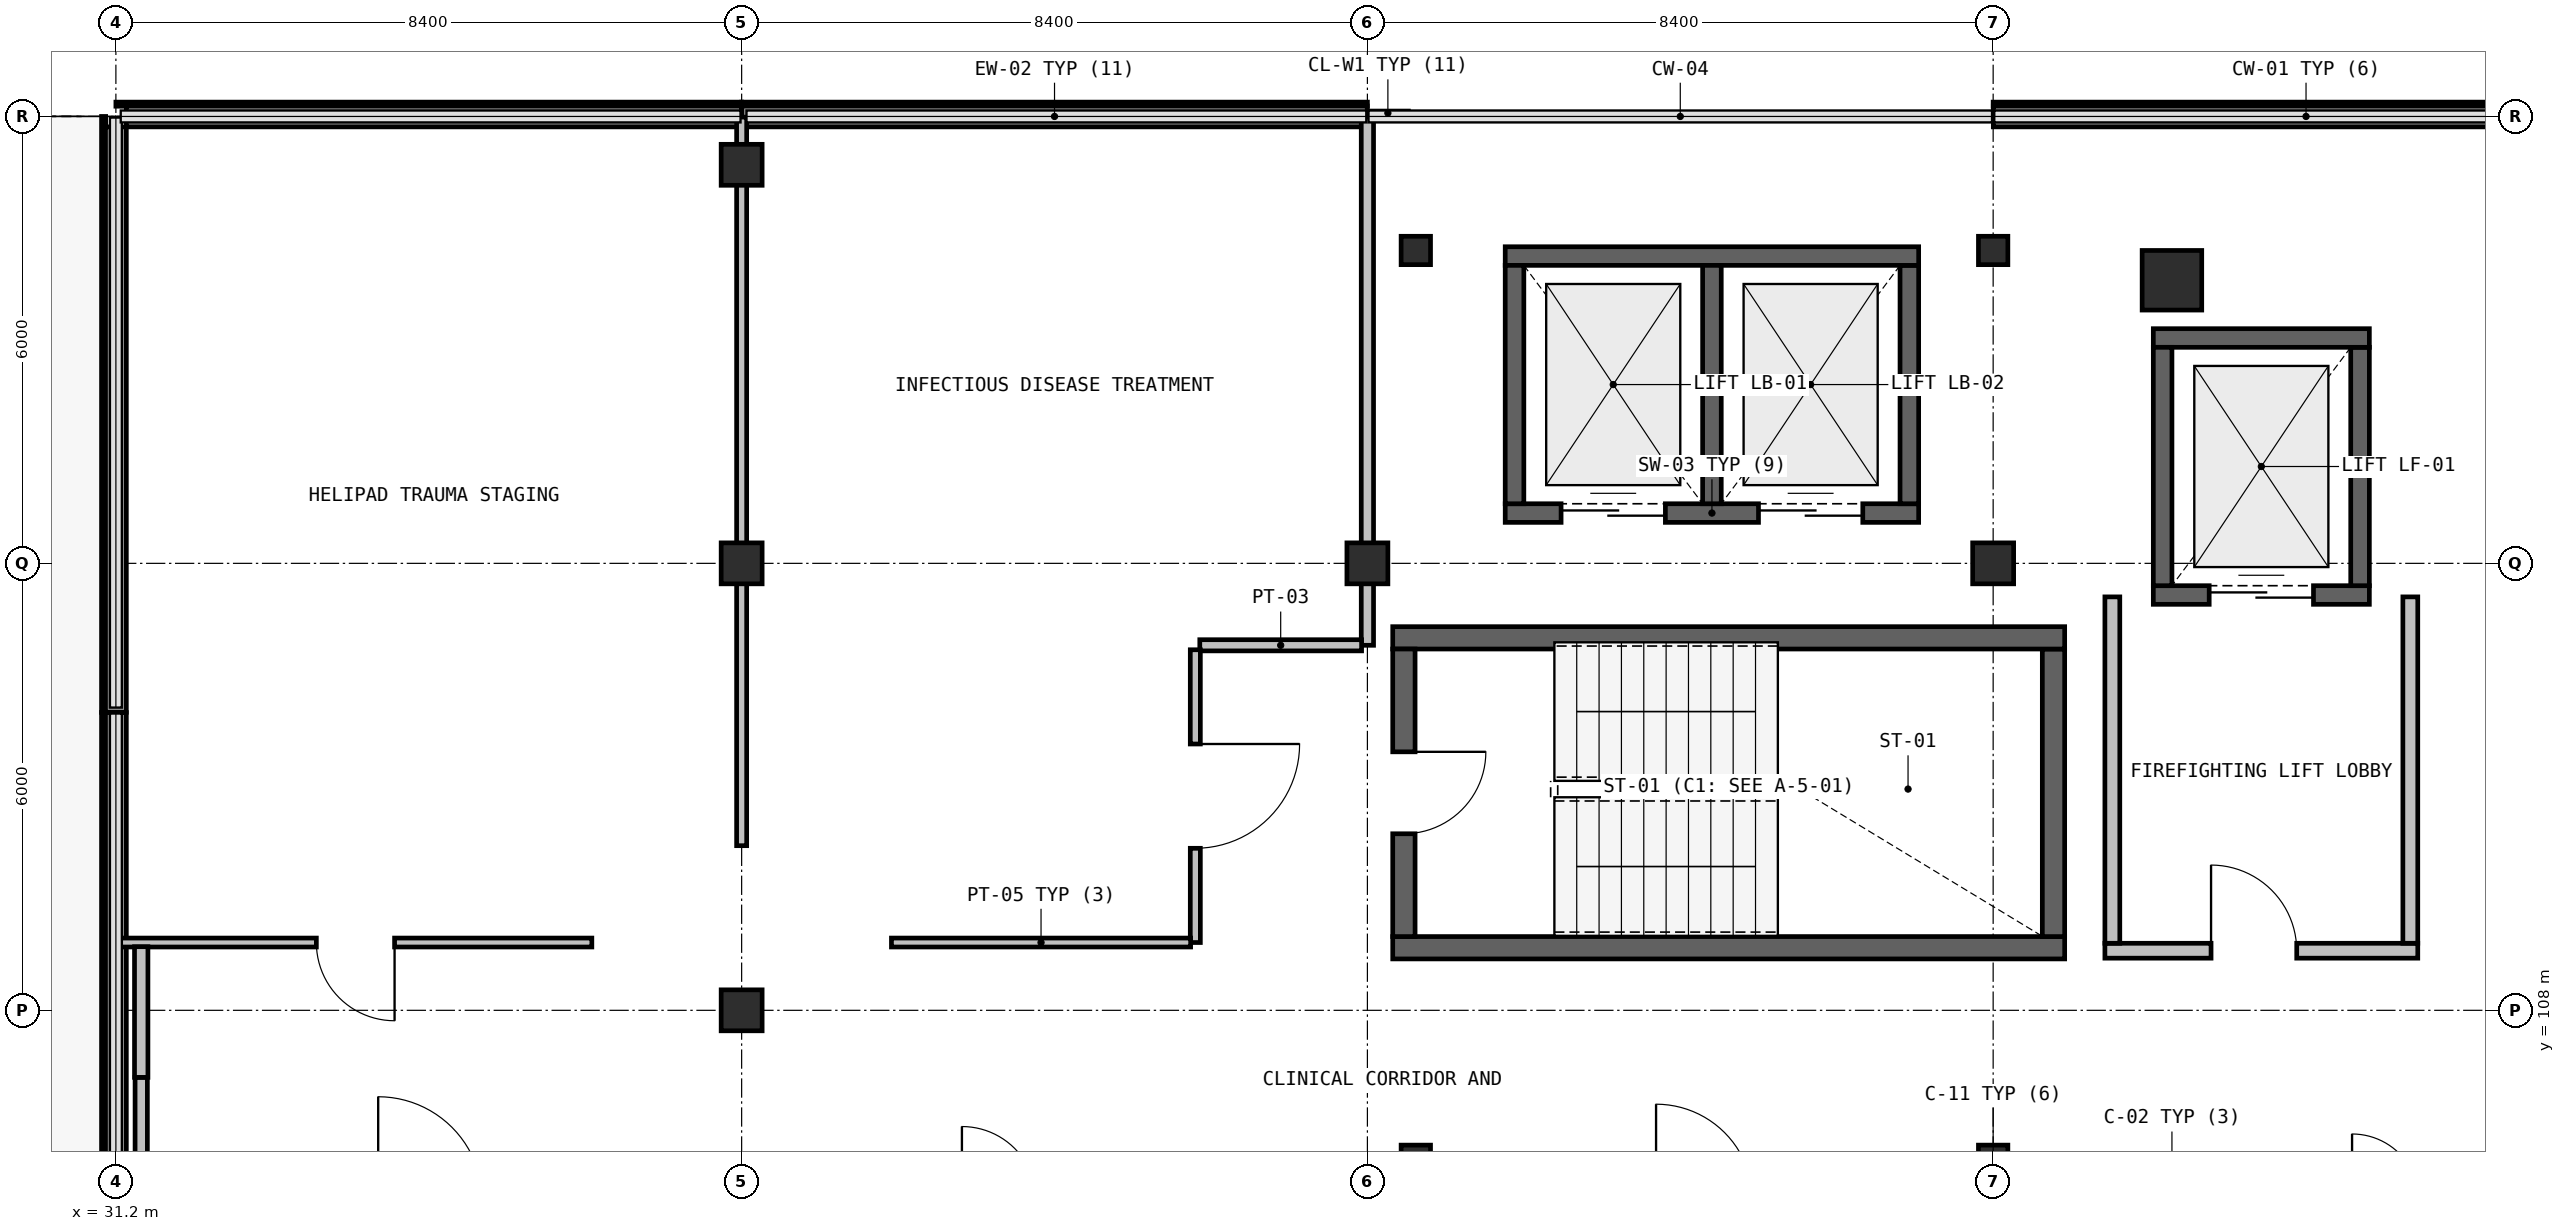
"""IFC4 building model, lengths in metres.
Left out: names, types, materials, properties, quantities, classifications, styles, units other than length and angle.
Written with IfcOpenShell. Run it as: python <this file> out.ifc"""

import sys

from ifc_helpers import new_model, si_unit, direction, frame, frame_2d, origin, origin_2d, place, context, subcontext, project, spatial, rectangle, i_section, extrude, element, fill, save


model = new_model("IFC4")
c1 = context("Model", 3, precision=1e-05, world=origin(), true_north=direction((0.0, 1.0)))
c2 = subcontext(c1, "Body", "Model", "MODEL_VIEW")
j1 = project(units=[si_unit("LENGTHUNIT", "METRE"), si_unit("PLANEANGLEUNIT", "RADIAN")], contexts=[c1])
p1 = place(None, origin())
s1 = spatial("IfcSite", under=j1, at=p1, CompositionType="ELEMENT")
p2 = place(p1, origin())
s2 = spatial("IfcBuilding", under=s1, at=p2, CompositionType="ELEMENT")
p3 = place(p2, frame((0.0, 0.0, 35.4)))
s3 = spatial("IfcBuildingStorey", under=s2, at=p3, CompositionType="ELEMENT", Elevation=35.4)
p4 = place(p3, frame((58.8, 117.8, 0.0), z_axis=(0.0, 0.0, 1.0), x_axis=(1.0, 0.0, 0.0)))
e1 = element("IfcColumn", 1, at=p4, inside=s3, PredefinedType="COLUMN", context=c2, shape_type="SweptSolid", body=[
    extrude(rectangle(XDim=0.8, YDim=0.8, at=origin_2d()), origin(), (0.0, 0.0, 1.0), 4.05),
])
for number, where, z_axis, x_axis in (
    (2, (48.65, 106.0, 0.0), (0.0, 0.0, 1.0), (1.0, 0.0, 0.0)),
    (3, (56.4, 106.0, 0.0), (0.0, 0.0, 1.0), (1.0, 0.0, 0.0)),
    (4, (48.65, 118.2, 0.0), (0.0, 0.0, 1.0), (1.0, 0.0, 0.0)),
    (5, (56.4, 118.2, 0.0), (0.0, 0.0, 1.0), (1.0, 0.0, 0.0)),
):
    element("IfcColumn", number, at=place(p3, frame(where, z_axis=z_axis, x_axis=x_axis)), inside=s3, PredefinedType="COLUMN", context=c2, shape_type="SweptSolid", body=[
        extrude(i_section(OverallWidth=0.395, OverallDepth=0.381, WebThickness=0.018, FlangeThickness=0.03, at=origin_2d()), origin(), (0.0, 0.0, 1.0), 4.05),
    ])
for number, where, z_axis, x_axis in (
    (6, (39.6, 108.0, 0.0), (0.0, 0.0, 1.0), (1.0, 0.0, 0.0)),
    (7, (39.6, 114.0, 0.0), (0.0, 0.0, 1.0), (1.0, 0.0, 0.0)),
    (8, (39.6, 119.35, 0.0), (0.0, 0.0, 1.0), (1.0, 0.0, 0.0)),
    (9, (48.0, 114.0, 0.0), (0.0, 0.0, 1.0), (1.0, 0.0, 0.0)),
    (10, (56.4, 114.0, 0.0), (0.0, 0.0, 1.0), (1.0, 0.0, 0.0)),
):
    element("IfcColumn", number, at=place(p3, frame(where, z_axis=z_axis, x_axis=x_axis)), inside=s3, PredefinedType="COLUMN", context=c2, shape_type="SweptSolid", body=[
        extrude(rectangle(XDim=0.55, YDim=0.55, at=origin_2d()), origin(), (0.0, 0.0, 1.0), 3.74),
    ])
p5 = place(p3, frame((31.2, 104.001, 0.0), z_axis=(0.0, 0.0, 1.0), x_axis=(0.0, 1.0, 0.0)))
e11 = element("IfcWall", 11, at=p5, inside=s3, PredefinedType="SOLIDWALL", context=c2, shape_type="SweptSolid", body=[
    extrude(rectangle(XDim=7.996, YDim=0.28, at=frame_2d((3.998, 0.0))), origin(), (0.0, 0.0, 1.0), 0.94),
])
p6 = place(p3, frame((31.2, 112.001, 0.0), z_axis=(0.0, 0.0, 1.0), x_axis=(0.0, 1.0, 0.0)))
e12 = element("IfcWall", 12, at=p6, inside=s3, PredefinedType="SOLIDWALL", context=c2, shape_type="SweptSolid", body=[
    extrude(rectangle(XDim=7.858, YDim=0.28, at=frame_2d((3.929, 0.0))), origin(), (0.0, 0.0, 1.0), 0.94),
])
p7 = place(p3, frame((31.34, 119.999, 0.0), z_axis=(0.0, 0.0, 1.0), x_axis=(1.0, 0.0, 0.0)))
e13 = element("IfcWall", 13, at=p7, inside=s3, PredefinedType="SOLIDWALL", context=c2, shape_type="SweptSolid", body=[
    extrude(rectangle(XDim=8.258, YDim=0.28, at=frame_2d((4.129, 0.0))), origin(), (0.0, 0.0, 1.0), 0.94),
])
for number, where, z_axis, x_axis in (
    (14, (39.602, 119.999, 0.0), (0.0, 0.0, 1.0), (1.0, 0.0, 0.0)),
    (15, (56.402, 119.999, 0.0), (0.0, 0.0, 1.0), (1.0, 0.0, 0.0)),
):
    element("IfcWall", number, at=place(p3, frame(where, z_axis=z_axis, x_axis=x_axis)), inside=s3, PredefinedType="SOLIDWALL", context=c2, shape_type="SweptSolid", body=[
        extrude(rectangle(XDim=8.396, YDim=0.28, at=frame_2d((4.198, 0.0))), origin(), (0.0, 0.0, 1.0), 0.94),
    ])
p8 = place(p3, frame((48.34, 108.84, 0.0), z_axis=(0.0, 0.0, 1.0), x_axis=(1.0, 0.0, 0.0)))
e16 = element("IfcWall", 16, at=p8, inside=s3, PredefinedType="SHEAR", context=c2, shape_type="SweptSolid", body=[
    extrude(rectangle(XDim=9.02, YDim=0.3, at=frame_2d((4.51, 0.0))), origin(), (0.0, 0.0, 1.0), 3.74),
])
p9 = place(p3, frame((57.21, 108.99, 0.0), z_axis=(0.0, 0.0, 1.0), x_axis=(0.0, 1.0, 0.0)))
e17 = element("IfcWall", 17, at=p9, inside=s3, PredefinedType="SHEAR", context=c2, shape_type="SweptSolid", body=[
    extrude(rectangle(XDim=3.86, YDim=0.3, at=frame_2d((1.93, 0.0))), origin(), (0.0, 0.0, 1.0), 3.74),
])
p10 = place(p3, frame((57.36, 113.0, 0.0), z_axis=(0.0, 0.0, 1.0), x_axis=(-1.0, 0.0, 0.0)))
e18 = element("IfcWall", 18, at=p10, inside=s3, PredefinedType="SHEAR", context=c2, shape_type="SweptSolid", body=[
    extrude(rectangle(XDim=9.02, YDim=0.3, at=frame_2d((4.51, 0.0))), origin(), (0.0, 0.0, 1.0), 3.74),
])
p11 = place(p3, frame((48.49, 112.85, 0.0), z_axis=(0.0, 0.0, 1.0), x_axis=(0.0, -1.0, 0.0)))
e19 = element("IfcWall", 19, at=p11, inside=s3, PredefinedType="SHEAR", context=c2, shape_type="SweptSolid", body=[
    extrude(rectangle(XDim=3.86, YDim=0.3, at=frame_2d((1.93, 0.0))), origin(), (0.0, 0.0, 1.0), 3.74),
])
p12 = place(p11, frame((1.38, 0.0, 0.0)))
e20 = element("IfcOpeningElement", 20, at=p12, cuts=e19, PredefinedType="OPENING", context=c2, shape_type="SweptSolid", body=[
    extrude(rectangle(XDim=1.1, YDim=2.15, at=frame_2d((0.55, 1.075))), frame((0.0, 0.16, 0.0), z_axis=(0.0, -1.0, 0.0), x_axis=(1.0, 0.0, 0.0)), (0.0, 0.0, 1.0), 0.32),
])
p13 = place(p3, frame((57.9, 108.8, 0.0), z_axis=(0.0, 0.0, 1.0), x_axis=(1.0, 0.0, 0.0)))
e21 = element("IfcWall", 21, at=p13, inside=s3, PredefinedType="SOLIDWALL", context=c2, shape_type="SweptSolid", body=[
    extrude(rectangle(XDim=4.2, YDim=0.2, at=frame_2d((2.1, 0.0))), origin(), (0.0, 0.0, 1.0), 3.74),
])
p14 = place(p13, frame((1.425, 0.0, 0.0)))
e22 = element("IfcOpeningElement", 22, at=p14, cuts=e21, PredefinedType="OPENING", context=c2, shape_type="SweptSolid", body=[
    extrude(rectangle(XDim=1.15, YDim=2.15, at=frame_2d((0.575, 1.075))), frame((0.0, 0.11, 0.0), z_axis=(0.0, -1.0, 0.0), x_axis=(1.0, 0.0, 0.0)), (0.0, 0.0, 1.0), 0.22),
])
for number, where, z_axis, x_axis in (
    (23, (62.0, 108.9, 0.0), (0.0, 0.0, 1.0), (0.0, 1.0, 0.0)),
    (24, (58.0, 113.55, 0.0), (0.0, 0.0, 1.0), (0.0, -1.0, 0.0)),
):
    element("IfcWall", number, at=place(p3, frame(where, z_axis=z_axis, x_axis=x_axis)), inside=s3, PredefinedType="SOLIDWALL", context=c2, shape_type="SweptSolid", body=[
        extrude(rectangle(XDim=4.65, YDim=0.2, at=frame_2d((2.325, 0.0))), origin(), (0.0, 0.0, 1.0), 3.74),
    ])
p15 = place(p3, frame((58.55, 113.575, 0.0), z_axis=(0.0, 0.0, 1.0), x_axis=(1.0, 0.0, 0.0)))
e25 = element("IfcWall", 25, at=p15, inside=s3, PredefinedType="SHEAR", context=c2, shape_type="SweptSolid", body=[
    extrude(rectangle(XDim=2.9, YDim=0.25, at=frame_2d((1.45, 0.0))), origin(), (0.0, 0.0, 1.0), 3.74),
])
p16 = place(p15, frame((0.75, 0.0, 0.0)))
e26 = element("IfcOpeningElement", 26, at=p16, cuts=e25, PredefinedType="OPENING", context=c2, shape_type="SweptSolid", body=[
    extrude(rectangle(XDim=1.4, YDim=2.15, at=frame_2d((0.7, 1.075))), frame((0.0, 0.135, 0.0), z_axis=(0.0, -1.0, 0.0), x_axis=(1.0, 0.0, 0.0)), (0.0, 0.0, 1.0), 0.27),
])
p17 = place(p3, frame((61.325, 113.7, 0.0), z_axis=(0.0, 0.0, 1.0), x_axis=(0.0, 1.0, 0.0)))
e27 = element("IfcWall", 27, at=p17, inside=s3, PredefinedType="SHEAR", context=c2, shape_type="SweptSolid", body=[
    extrude(rectangle(XDim=3.2, YDim=0.25, at=frame_2d((1.6, 0.0))), origin(), (0.0, 0.0, 1.0), 3.74),
])
p18 = place(p3, frame((61.45, 117.025, 0.0), z_axis=(0.0, 0.0, 1.0), x_axis=(-1.0, 0.0, 0.0)))
e28 = element("IfcWall", 28, at=p18, inside=s3, PredefinedType="SHEAR", context=c2, shape_type="SweptSolid", body=[
    extrude(rectangle(XDim=2.9, YDim=0.25, at=frame_2d((1.45, 0.0))), origin(), (0.0, 0.0, 1.0), 3.74),
])
p19 = place(p3, frame((58.675, 116.9, 0.0), z_axis=(0.0, 0.0, 1.0), x_axis=(0.0, -1.0, 0.0)))
e29 = element("IfcWall", 29, at=p19, inside=s3, PredefinedType="SHEAR", context=c2, shape_type="SweptSolid", body=[
    extrude(rectangle(XDim=3.2, YDim=0.25, at=frame_2d((1.6, 0.0))), origin(), (0.0, 0.0, 1.0), 3.74),
])
p20 = place(p3, frame((49.85, 114.675, 0.0), z_axis=(0.0, 0.0, 1.0), x_axis=(1.0, 0.0, 0.0)))
e30 = element("IfcWall", 30, at=p20, inside=s3, PredefinedType="SHEAR", context=c2, shape_type="SweptSolid", body=[
    extrude(rectangle(XDim=5.55, YDim=0.25, at=frame_2d((2.775, 0.0))), origin(), (0.0, 0.0, 1.0), 3.74),
])
p21 = place(p20, frame((0.75, 0.0, 0.0)))
e31 = element("IfcOpeningElement", 31, at=p21, cuts=e30, PredefinedType="OPENING", context=c2, shape_type="SweptSolid", body=[
    extrude(rectangle(XDim=1.4, YDim=2.2, at=frame_2d((0.7, 1.1))), frame((0.0, 0.135, 0.0), z_axis=(0.0, -1.0, 0.0), x_axis=(1.0, 0.0, 0.0)), (0.0, 0.0, 1.0), 0.27),
])
p22 = place(p20, frame((3.4, 0.0, 0.0)))
e32 = element("IfcOpeningElement", 32, at=p22, cuts=e30, PredefinedType="OPENING", context=c2, shape_type="SweptSolid", body=[
    extrude(rectangle(XDim=1.4, YDim=2.2, at=frame_2d((0.7, 1.1))), frame((0.0, 0.135, 0.0), z_axis=(0.0, -1.0, 0.0), x_axis=(1.0, 0.0, 0.0)), (0.0, 0.0, 1.0), 0.27),
])
p23 = place(p3, frame((55.275, 114.8, 0.0), z_axis=(0.0, 0.0, 1.0), x_axis=(0.0, 1.0, 0.0)))
e33 = element("IfcWall", 33, at=p23, inside=s3, PredefinedType="SHEAR", context=c2, shape_type="SweptSolid", body=[
    extrude(rectangle(XDim=3.2, YDim=0.25, at=frame_2d((1.6, 0.0))), origin(), (0.0, 0.0, 1.0), 3.74),
])
p24 = place(p3, frame((55.4, 118.125, 0.0), z_axis=(0.0, 0.0, 1.0), x_axis=(-1.0, 0.0, 0.0)))
e34 = element("IfcWall", 34, at=p24, inside=s3, PredefinedType="SHEAR", context=c2, shape_type="SweptSolid", body=[
    extrude(rectangle(XDim=5.55, YDim=0.25, at=frame_2d((2.775, 0.0))), origin(), (0.0, 0.0, 1.0), 3.74),
])
for number, where, z_axis, x_axis in (
    (35, (49.975, 118.0, 0.0), (0.0, 0.0, 1.0), (0.0, -1.0, 0.0)),
    (36, (52.625, 114.8, 0.0), (0.0, 0.0, 1.0), (0.0, 1.0, 0.0)),
):
    element("IfcWall", number, at=place(p3, frame(where, z_axis=z_axis, x_axis=x_axis)), inside=s3, PredefinedType="SHEAR", context=c2, shape_type="SweptSolid", body=[
        extrude(rectangle(XDim=3.2, YDim=0.25, at=frame_2d((1.6, 0.0))), origin(), (0.0, 0.0, 1.0), 3.74),
    ])
p25 = place(p3, frame((31.54, 107.1, 0.0), z_axis=(0.0, 0.0, 1.0), x_axis=(0.0, -1.0, 0.0)))
e37 = element("IfcWall", 37, at=p25, inside=s3, PredefinedType="PARTITIONING", context=c2, shape_type="SweptSolid", body=[
    extrude(rectangle(XDim=1.6, YDim=0.165, at=frame_2d((0.8, 0.0))), origin(), (0.0, 0.0, 1.0), 3.74),
])
p26 = place(p3, frame((39.6, 119.99, 0.0), z_axis=(0.0, 0.0, 1.0), x_axis=(0.0, -1.0, 0.0)))
e38 = element("IfcWall", 38, at=p26, inside=s3, PredefinedType="PARTITIONING", context=c2, shape_type="SweptSolid", body=[
    extrude(rectangle(XDim=9.78, YDim=0.135, at=frame_2d((4.89, 0.0))), origin(), (0.0, 0.0, 1.0), 3.14),
])
p27 = place(p3, frame((37.589, 108.91, 0.0), z_axis=(0.0, 0.0, 1.0), x_axis=(-1.0, 0.0, 0.0)))
e39 = element("IfcWall", 39, at=p27, inside=s3, PredefinedType="PARTITIONING", context=c2, shape_type="SweptSolid", body=[
    extrude(rectangle(XDim=6.347, YDim=0.12, at=frame_2d((3.174, 0.0))), origin(), (0.0, 0.0, 1.0), 3.74),
])
p28 = place(p27, frame((2.648, 0.0, 0.0)))
e40 = element("IfcOpeningElement", 40, at=p28, cuts=e39, PredefinedType="OPENING", context=c2, shape_type="SweptSolid", body=[
    extrude(rectangle(XDim=1.05, YDim=2.15, at=frame_2d((0.525, 1.075))), frame((0.0, 0.07, 0.0), z_axis=(0.0, -1.0, 0.0), x_axis=(1.0, 0.0, 0.0)), (0.0, 0.0, 1.0), 0.14),
])
p29 = place(p3, frame((31.54, 108.854, 0.0), z_axis=(0.0, 0.0, 1.0), x_axis=(0.0, -1.0, 0.0)))
e41 = element("IfcWall", 41, at=p29, inside=s3, PredefinedType="PARTITIONING", context=c2, shape_type="SweptSolid", body=[
    extrude(rectangle(XDim=1.754, YDim=0.18, at=frame_2d((0.877, 0.0))), origin(), (0.0, 0.0, 1.0), 3.74),
])
p30 = place(p3, frame((48.0, 119.99, 0.0), z_axis=(0.0, 0.0, 1.0), x_axis=(0.0, -1.0, 0.0)))
e42 = element("IfcWall", 42, at=p30, inside=s3, PredefinedType="PARTITIONING", context=c2, shape_type="SweptSolid", body=[
    extrude(rectangle(XDim=7.09, YDim=0.165, at=frame_2d((3.545, 0.0))), origin(), (0.0, 0.0, 1.0), 3.14),
])
p31 = place(p3, frame((47.922, 112.9, 0.0), z_axis=(0.0, 0.0, 1.0), x_axis=(-1.0, 0.0, 0.0)))
e43 = element("IfcWall", 43, at=p31, inside=s3, PredefinedType="PARTITIONING", context=c2, shape_type="SweptSolid", body=[
    extrude(rectangle(XDim=2.172, YDim=0.15, at=frame_2d((1.086, 0.0))), origin(), (0.0, 0.0, 1.0), 3.74),
])
p32 = place(p3, frame((45.69, 112.84, 0.0), z_axis=(0.0, 0.0, 1.0), x_axis=(0.0, -1.0, 0.0)))
e44 = element("IfcWall", 44, at=p32, inside=s3, PredefinedType="PARTITIONING", context=c2, shape_type="SweptSolid", body=[
    extrude(rectangle(XDim=3.93, YDim=0.135, at=frame_2d((1.965, 0.0))), origin(), (0.0, 0.0, 1.0), 3.74),
])
p33 = place(p32, frame((1.265, 0.0, 0.0)))
e45 = element("IfcOpeningElement", 45, at=p33, cuts=e44, PredefinedType="OPENING", context=c2, shape_type="SweptSolid", body=[
    extrude(rectangle(XDim=1.4, YDim=2.15, at=frame_2d((0.7, 1.075))), frame((0.0, 0.077, 0.0), z_axis=(0.0, -1.0, 0.0), x_axis=(1.0, 0.0, 0.0)), (0.0, 0.0, 1.0), 0.155),
])
p34 = place(p3, frame((45.627, 108.91, 0.0), z_axis=(0.0, 0.0, 1.0), x_axis=(-1.0, 0.0, 0.0)))
e46 = element("IfcWall", 46, at=p34, inside=s3, PredefinedType="PARTITIONING", context=c2, shape_type="SweptSolid", body=[
    extrude(rectangle(XDim=4.016, YDim=0.12, at=frame_2d((2.008, 0.0))), origin(), (0.0, 0.0, 1.0), 3.74),
])
p35 = place(p12, origin())
e47 = element("IfcDoor", 47, at=p35, inside=s3, OperationType="SINGLE_SWING_RIGHT", PredefinedType="DOOR", context=c2, shape_type="SweptSolid", body=[
    extrude(rectangle(XDim=1.1, YDim=2.15, at=frame_2d((0.55, 1.075))), frame((0.0, 0.025, 0.0), z_axis=(0.0, -1.0, 0.0), x_axis=(1.0, 0.0, 0.0)), (0.0, 0.0, 1.0), 0.05),
])
fill(e20, e47)
p36 = place(p14, origin())
e48 = element("IfcDoor", 48, at=p36, inside=s3, OperationType="SINGLE_SWING_LEFT", PredefinedType="DOOR", context=c2, shape_type="SweptSolid", body=[
    extrude(rectangle(XDim=1.15, YDim=2.15, at=frame_2d((0.575, 1.075))), frame((0.0, 0.025, 0.0), z_axis=(0.0, -1.0, 0.0), x_axis=(1.0, 0.0, 0.0)), (0.0, 0.0, 1.0), 0.05),
])
fill(e22, e48)
p37 = place(p16, origin())
e49 = element("IfcDoor", 49, at=p37, inside=s3, OperationType="DOUBLE_DOOR_SLIDING", PredefinedType="DOOR", context=c2, shape_type="SweptSolid", body=[
    extrude(rectangle(XDim=1.4, YDim=2.15, at=frame_2d((0.7, 1.075))), frame((0.0, 0.025, 0.0), z_axis=(0.0, -1.0, 0.0), x_axis=(1.0, 0.0, 0.0)), (0.0, 0.0, 1.0), 0.05),
])
fill(e26, e49)
p38 = place(p21, origin())
e50 = element("IfcDoor", 50, at=p38, inside=s3, OperationType="DOUBLE_DOOR_SLIDING", PredefinedType="DOOR", context=c2, shape_type="SweptSolid", body=[
    extrude(rectangle(XDim=1.4, YDim=2.2, at=frame_2d((0.7, 1.1))), frame((0.0, 0.025, 0.0), z_axis=(0.0, -1.0, 0.0), x_axis=(1.0, 0.0, 0.0)), (0.0, 0.0, 1.0), 0.05),
])
fill(e31, e50)
p39 = place(p22, origin())
e51 = element("IfcDoor", 51, at=p39, inside=s3, OperationType="DOUBLE_DOOR_SLIDING", PredefinedType="DOOR", context=c2, shape_type="SweptSolid", body=[
    extrude(rectangle(XDim=1.4, YDim=2.2, at=frame_2d((0.7, 1.1))), frame((0.0, 0.025, 0.0), z_axis=(0.0, -1.0, 0.0), x_axis=(1.0, 0.0, 0.0)), (0.0, 0.0, 1.0), 0.05),
])
fill(e32, e51)
p40 = place(p28, origin())
e52 = element("IfcDoor", 52, at=p40, inside=s3, OperationType="SINGLE_SWING_RIGHT", PredefinedType="DOOR", context=c2, shape_type="SweptSolid", body=[
    extrude(rectangle(XDim=1.05, YDim=2.15, at=frame_2d((0.525, 1.075))), frame((0.0, 0.025, 0.0), z_axis=(0.0, -1.0, 0.0), x_axis=(1.0, 0.0, 0.0)), (0.0, 0.0, 1.0), 0.05),
])
fill(e40, e52)
p41 = place(p33, origin())
e53 = element("IfcDoor", 53, at=p41, inside=s3, OperationType="SINGLE_SWING_LEFT", PredefinedType="DOOR", context=c2, shape_type="SweptSolid", body=[
    extrude(rectangle(XDim=1.4, YDim=2.15, at=frame_2d((0.7, 1.075))), frame((0.0, 0.025, 0.0), z_axis=(0.0, -1.0, 0.0), x_axis=(1.0, 0.0, 0.0)), (0.0, 0.0, 1.0), 0.05),
])
fill(e45, e53)
save(model, sys.argv[1])
